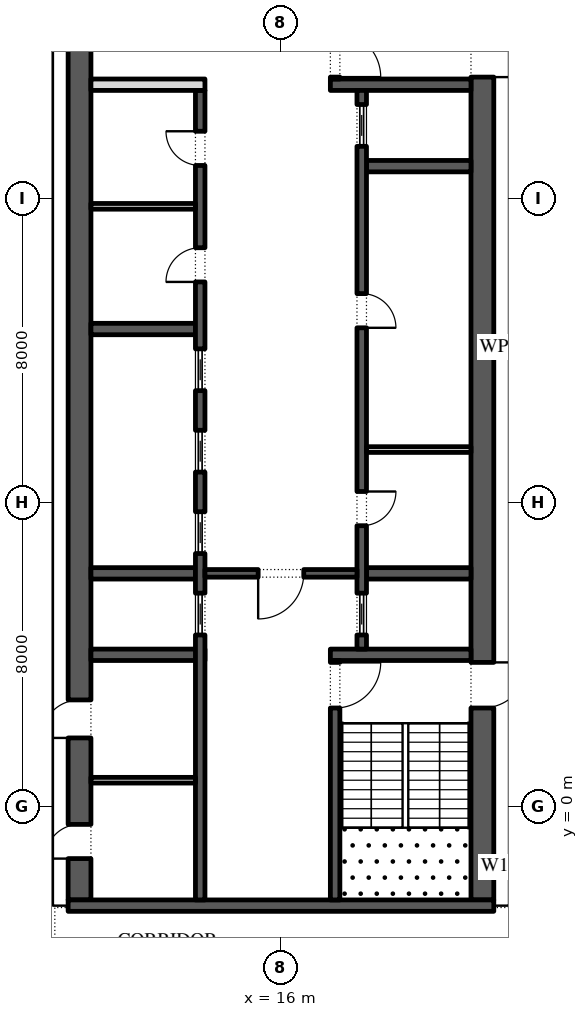
"""IFC4 building model, lengths in metres.
Left out: names, types, materials, properties, quantities, classifications, styles, units other than length and angle.
Written with IfcOpenShell. Run it as: python <this file> out.ifc"""

import sys

from ifc_helpers import new_model, si_unit, direction, frame, frame_2d, origin, place, context, subcontext, project, spatial, rectangle, extrude, element, fill, save


model = new_model("IFC4")
c1 = context("Model", 3, precision=1e-05, world=origin(), true_north=direction((0.0, 1.0)))
c2 = subcontext(c1, "Body", "Model", "MODEL_VIEW")
j1 = project(units=[si_unit("LENGTHUNIT", "METRE"), si_unit("PLANEANGLEUNIT", "RADIAN")], contexts=[c1])
p1 = place(None, origin())
s1 = spatial("IfcSite", under=j1, at=p1, CompositionType="ELEMENT")
p2 = place(p1, origin())
s2 = spatial("IfcBuilding", under=s1, at=p2, CompositionType="ELEMENT")
p3 = place(p2, frame((0.0, 0.0, 280.8)))
s3 = spatial("IfcBuildingStorey", under=s2, at=p3, CompositionType="ELEMENT", Elevation=280.8)
p4 = place(p3, frame((21.359, -11.678, 0.0), z_axis=(0.0, 0.0, 1.0), x_axis=(0.224949198343, 0.974370493275, 0.0)))
e1 = element("IfcWall", 1, at=p4, inside=s3, PredefinedType="STANDARD", context=c2, shape_type="SweptSolid", body=[
    extrude(rectangle(XDim=49.5, YDim=0.3, at=frame_2d((24.75, 0.0))), origin(), (0.0, 0.0, 1.0), 4.0),
])
p5 = place(p4, frame((1.157, 0.0, 0.45)))
e2 = element("IfcOpeningElement", 2, at=p5, cuts=e1, PredefinedType="OPENING", context=c2, shape_type="SweptSolid", body=[
    extrude(rectangle(XDim=4.5, YDim=3.05, at=frame_2d((2.25, 1.525))), frame((0.0, 0.16, 0.0), z_axis=(0.0, -1.0, 0.0), x_axis=(1.0, 0.0, 0.0)), (0.0, 0.0, 1.0), 0.32),
])
p6 = place(p4, frame((8.121, 0.0, 0.45)))
e3 = element("IfcOpeningElement", 3, at=p6, cuts=e1, PredefinedType="OPENING", context=c2, shape_type="SweptSolid", body=[
    extrude(rectangle(XDim=4.5, YDim=3.05, at=frame_2d((2.25, 1.525))), frame((0.0, 0.16, 0.0), z_axis=(0.0, -1.0, 0.0), x_axis=(1.0, 0.0, 0.0)), (0.0, 0.0, 1.0), 0.32),
])
p7 = place(p4, frame((15.236, 0.0, 0.45)))
e4 = element("IfcOpeningElement", 4, at=p7, cuts=e1, PredefinedType="OPENING", context=c2, shape_type="SweptSolid", body=[
    extrude(rectangle(XDim=4.5, YDim=3.05, at=frame_2d((2.25, 1.525))), frame((0.0, 0.16, 0.0), z_axis=(0.0, -1.0, 0.0), x_axis=(1.0, 0.0, 0.0)), (0.0, 0.0, 1.0), 0.32),
])
p8 = place(p4, frame((22.35, 0.0, 0.45)))
e5 = element("IfcOpeningElement", 5, at=p8, cuts=e1, PredefinedType="OPENING", context=c2, shape_type="SweptSolid", body=[
    extrude(rectangle(XDim=4.5, YDim=3.05, at=frame_2d((2.25, 1.525))), frame((0.0, 0.16, 0.0), z_axis=(0.0, -1.0, 0.0), x_axis=(1.0, 0.0, 0.0)), (0.0, 0.0, 1.0), 0.32),
])
p9 = place(p4, frame((29.464, 0.0, 0.45)))
e6 = element("IfcOpeningElement", 6, at=p9, cuts=e1, PredefinedType="OPENING", context=c2, shape_type="SweptSolid", body=[
    extrude(rectangle(XDim=4.5, YDim=2.95, at=frame_2d((2.25, 1.475))), frame((0.0, 0.16, 0.0), z_axis=(0.0, -1.0, 0.0), x_axis=(1.0, 0.0, 0.0)), (0.0, 0.0, 1.0), 0.32),
])
p10 = place(p4, frame((37.628, 0.0, 0.0)))
e7 = element("IfcOpeningElement", 7, at=p10, cuts=e1, PredefinedType="OPENING", context=c2, shape_type="SweptSolid", body=[
    extrude(rectangle(XDim=2.4, YDim=3.325, at=frame_2d((1.2, 1.663))), frame((0.0, 0.16, 0.0), z_axis=(0.0, -1.0, 0.0), x_axis=(1.0, 0.0, 0.0)), (0.0, 0.0, 1.0), 0.32),
])
p11 = place(p4, frame((43.693, 0.0, 0.45)))
e8 = element("IfcOpeningElement", 8, at=p11, cuts=e1, PredefinedType="OPENING", context=c2, shape_type="SweptSolid", body=[
    extrude(rectangle(XDim=4.5, YDim=2.575, at=frame_2d((2.25, 1.288))), frame((0.0, 0.16, 0.0), z_axis=(0.0, -1.0, 0.0), x_axis=(1.0, 0.0, 0.0)), (0.0, 0.0, 1.0), 0.32),
])
p12 = place(p3, frame((21.3, -2.45, 0.0), z_axis=(0.0, 0.0, 1.0), x_axis=(0.0, 1.0, 0.0)))
e9 = element("IfcWall", 9, at=p12, inside=s3, PredefinedType="SHEAR", context=c2, shape_type="SweptSolid", body=[
    extrude(rectangle(XDim=27.9, YDim=0.6, at=frame_2d((13.95, 0.0))), origin(), (0.0, 0.0, 1.0), 4.0),
])
p13 = place(p12, frame((5.05, 0.0, 0.0)))
e10 = element("IfcOpeningElement", 10, at=p13, cuts=e9, PredefinedType="OPENING", context=c2, shape_type="SweptSolid", body=[
    extrude(rectangle(XDim=1.2, YDim=2.1, at=frame_2d((0.6, 1.05))), frame((0.0, 0.31, 0.0), z_axis=(0.0, -1.0, 0.0), x_axis=(1.0, 0.0, 0.0)), (0.0, 0.0, 1.0), 0.62),
])
p14 = place(p12, frame((21.65, 0.0, 0.0)))
e11 = element("IfcOpeningElement", 11, at=p14, cuts=e9, PredefinedType="OPENING", context=c2, shape_type="SweptSolid", body=[
    extrude(rectangle(XDim=1.2, YDim=2.1, at=frame_2d((0.6, 1.05))), frame((0.0, 0.31, 0.0), z_axis=(0.0, -1.0, 0.0), x_axis=(1.0, 0.0, 0.0)), (0.0, 0.0, 1.0), 0.62),
])
p15 = place(p3, frame((10.7, -2.45, 0.0), z_axis=(0.0, 0.0, 1.0), x_axis=(0.0, 1.0, 0.0)))
e12 = element("IfcWall", 12, at=p15, inside=s3, PredefinedType="SHEAR", context=c2, shape_type="SweptSolid", body=[
    extrude(rectangle(XDim=27.9, YDim=0.6, at=frame_2d((13.95, 0.0))), origin(), (0.0, 0.0, 1.0), 4.0),
])
p16 = place(p15, frame((23.65, 0.0, 0.0)))
e13 = element("IfcOpeningElement", 13, at=p16, cuts=e12, PredefinedType="OPENING", context=c2, shape_type="SweptSolid", body=[
    extrude(rectangle(XDim=2.4, YDim=2.1, at=frame_2d((1.2, 1.05))), frame((0.0, 0.31, 0.0), z_axis=(0.0, -1.0, 0.0), x_axis=(1.0, 0.0, 0.0)), (0.0, 0.0, 1.0), 0.62),
])
p17 = place(p15, frame((1.087, 0.0, 0.0)))
e14 = element("IfcOpeningElement", 14, at=p17, cuts=e12, PredefinedType="OPENING", context=c2, shape_type="SweptSolid", body=[
    extrude(rectangle(XDim=0.9, YDim=2.1, at=frame_2d((0.45, 1.05))), frame((0.0, 0.31, 0.0), z_axis=(0.0, -1.0, 0.0), x_axis=(1.0, 0.0, 0.0)), (0.0, 0.0, 1.0), 0.62),
])
p18 = place(p15, frame((4.262, 0.0, 0.0)))
e15 = element("IfcOpeningElement", 15, at=p18, cuts=e12, PredefinedType="OPENING", context=c2, shape_type="SweptSolid", body=[
    extrude(rectangle(XDim=1.0, YDim=2.1, at=frame_2d((0.5, 1.05))), frame((0.0, 0.31, 0.0), z_axis=(0.0, -1.0, 0.0), x_axis=(1.0, 0.0, 0.0)), (0.0, 0.0, 1.0), 0.62),
])
p19 = place(p3, frame((10.4, -2.6, 0.0), z_axis=(0.0, 0.0, 1.0), x_axis=(1.0, 0.0, 0.0)))
e16 = element("IfcWall", 16, at=p19, inside=s3, PredefinedType="SHEAR", context=c2, shape_type="SweptSolid", body=[
    extrude(rectangle(XDim=11.2, YDim=0.3, at=frame_2d((5.6, 0.0))), origin(), (0.0, 0.0, 1.0), 4.0),
])
p20 = place(p3, frame((17.3, 4.0, 0.0), z_axis=(0.0, 0.0, 1.0), x_axis=(1.0, 0.0, 0.0)))
e17 = element("IfcWall", 17, at=p20, inside=s3, PredefinedType="SHEAR", context=c2, shape_type="SweptSolid", body=[
    extrude(rectangle(XDim=3.7, YDim=0.3, at=frame_2d((1.85, 0.0))), origin(), (0.0, 0.0, 1.0), 4.0),
])
p21 = place(p3, frame((17.425, -2.45, 0.0), z_axis=(0.0, 0.0, 1.0), x_axis=(0.0, 1.0, 0.0)))
e18 = element("IfcWall", 18, at=p21, inside=s3, PredefinedType="SHEAR", context=c2, shape_type="SweptSolid", body=[
    extrude(rectangle(XDim=6.3, YDim=0.25, at=frame_2d((3.15, 0.0))), origin(), (0.0, 0.0, 1.0), 4.0),
])
p22 = place(p21, frame((5.05, 0.0, 0.0)))
e19 = element("IfcOpeningElement", 19, at=p22, cuts=e18, PredefinedType="OPENING", context=c2, shape_type="SweptSolid", body=[
    extrude(rectangle(XDim=1.2, YDim=2.1, at=frame_2d((0.6, 1.05))), frame((0.0, 0.135, 0.0), z_axis=(0.0, -1.0, 0.0), x_axis=(1.0, 0.0, 0.0)), (0.0, 0.0, 1.0), 0.27),
])
p23 = place(p3, frame((17.3, 19.0, 0.0), z_axis=(0.0, 0.0, 1.0), x_axis=(1.0, 0.0, 0.0)))
e20 = element("IfcWall", 20, at=p23, inside=s3, PredefinedType="SHEAR", context=c2, shape_type="SweptSolid", body=[
    extrude(rectangle(XDim=3.7, YDim=0.3, at=frame_2d((1.85, 0.0))), origin(), (0.0, 0.0, 1.0), 4.0),
])
p24 = place(p3, frame((17.425, 19.15, 0.0), z_axis=(0.0, 0.0, 1.0), x_axis=(0.0, 1.0, 0.0)))
e21 = element("IfcWall", 21, at=p24, inside=s3, PredefinedType="SHEAR", context=c2, shape_type="SweptSolid", body=[
    extrude(rectangle(XDim=6.3, YDim=0.25, at=frame_2d((3.15, 0.0))), origin(), (0.0, 0.0, 1.0), 4.0),
])
p25 = place(p24, frame((0.05, 0.0, 0.0)))
e22 = element("IfcOpeningElement", 22, at=p25, cuts=e21, PredefinedType="OPENING", context=c2, shape_type="SweptSolid", body=[
    extrude(rectangle(XDim=1.2, YDim=2.1, at=frame_2d((0.6, 1.05))), frame((0.0, 0.135, 0.0), z_axis=(0.0, -1.0, 0.0), x_axis=(1.0, 0.0, 0.0)), (0.0, 0.0, 1.0), 0.27),
])
for number, where, z_axis, x_axis in (
    (23, (18.25, 6.143, 0.0), (0.0, 0.0, 1.0), (1.0, 0.0, 0.0)),
    (24, (18.25, 16.857, 0.0), (0.0, 0.0, 1.0), (1.0, 0.0, 0.0)),
):
    element("IfcWall", number, at=place(p3, frame(where, z_axis=z_axis, x_axis=x_axis)), inside=s3, PredefinedType="SHEAR", context=c2, shape_type="SweptSolid", body=[
        extrude(rectangle(XDim=2.75, YDim=0.3, at=frame_2d((1.375, 0.0))), origin(), (0.0, 0.0, 1.0), 4.0),
    ])
p26 = place(p3, frame((18.125, 4.15, 0.0), z_axis=(0.0, 0.0, 1.0), x_axis=(0.0, 1.0, 0.0)))
e25 = element("IfcWall", 25, at=p26, inside=s3, PredefinedType="SHEAR", context=c2, shape_type="SweptSolid", body=[
    extrude(rectangle(XDim=14.7, YDim=0.25, at=frame_2d((7.35, 0.0))), origin(), (0.0, 0.0, 1.0), 4.0),
])
p27 = place(p26, frame((3.246, 0.0, 0.0)))
e26 = element("IfcOpeningElement", 26, at=p27, cuts=e25, PredefinedType="OPENING", context=c2, shape_type="SweptSolid", body=[
    extrude(rectangle(XDim=0.9, YDim=2.1, at=frame_2d((0.45, 1.05))), frame((0.0, 0.135, 0.0), z_axis=(0.0, -1.0, 0.0), x_axis=(1.0, 0.0, 0.0)), (0.0, 0.0, 1.0), 0.27),
])
p28 = place(p26, frame((8.454, 0.0, 0.0)))
e27 = element("IfcOpeningElement", 27, at=p28, cuts=e25, PredefinedType="OPENING", context=c2, shape_type="SweptSolid", body=[
    extrude(rectangle(XDim=0.9, YDim=2.1, at=frame_2d((0.45, 1.05))), frame((0.0, 0.135, 0.0), z_axis=(0.0, -1.0, 0.0), x_axis=(1.0, 0.0, 0.0)), (0.0, 0.0, 1.0), 0.27),
])
p29 = place(p26, frame((0.371, 0.0, 0.0)))
e28 = element("IfcOpeningElement", 28, at=p29, cuts=e25, PredefinedType="OPENING", context=c2, shape_type="SweptSolid", body=[
    extrude(rectangle(XDim=1.1, YDim=2.1, at=frame_2d((0.55, 1.05))), frame((0.0, 0.135, 0.0), z_axis=(0.0, -1.0, 0.0), x_axis=(1.0, 0.0, 0.0)), (0.0, 0.0, 1.0), 0.27),
])
p30 = place(p26, frame((13.229, 0.0, 0.0)))
e29 = element("IfcOpeningElement", 29, at=p30, cuts=e25, PredefinedType="OPENING", context=c2, shape_type="SweptSolid", body=[
    extrude(rectangle(XDim=1.1, YDim=2.1, at=frame_2d((0.55, 1.05))), frame((0.0, 0.135, 0.0), z_axis=(0.0, -1.0, 0.0), x_axis=(1.0, 0.0, 0.0)), (0.0, 0.0, 1.0), 0.27),
])
p31 = place(p3, frame((18.25, 9.4, 0.0), z_axis=(0.0, 0.0, 1.0), x_axis=(1.0, 0.0, 0.0)))
e30 = element("IfcWall", 30, at=p31, inside=s3, PredefinedType="PARTITIONING", context=c2, shape_type="SweptSolid", body=[
    extrude(rectangle(XDim=2.75, YDim=0.15, at=frame_2d((1.375, 0.0))), origin(), (0.0, 0.0, 1.0), 4.0),
])
p32 = place(p3, frame((11.0, 4.0, 0.0), z_axis=(0.0, 0.0, 1.0), x_axis=(1.0, 0.0, 0.0)))
e31 = element("IfcWall", 31, at=p32, inside=s3, PredefinedType="SHEAR", context=c2, shape_type="SweptSolid", body=[
    extrude(rectangle(XDim=3.0, YDim=0.3, at=frame_2d((1.5, 0.0))), origin(), (0.0, 0.0, 1.0), 4.0),
])
for number, where, z_axis, x_axis in (
    (32, (11.0, 6.143, 0.0), (0.0, 0.0, 1.0), (1.0, 0.0, 0.0)),
    (33, (11.0, 12.571, 0.0), (0.0, 0.0, 1.0), (1.0, 0.0, 0.0)),
):
    element("IfcWall", number, at=place(p3, frame(where, z_axis=z_axis, x_axis=x_axis)), inside=s3, PredefinedType="SHEAR", context=c2, shape_type="SweptSolid", body=[
        extrude(rectangle(XDim=2.75, YDim=0.3, at=frame_2d((1.375, 0.0))), origin(), (0.0, 0.0, 1.0), 4.0),
    ])
p33 = place(p3, frame((13.875, -2.45, 0.0), z_axis=(0.0, 0.0, 1.0), x_axis=(0.0, 1.0, 0.0)))
e34 = element("IfcWall", 34, at=p33, inside=s3, PredefinedType="SHEAR", context=c2, shape_type="SweptSolid", body=[
    extrude(rectangle(XDim=21.3, YDim=0.25, at=frame_2d((10.65, 0.0))), origin(), (0.0, 0.0, 1.0), 4.0),
])
p34 = place(p33, frame((16.261, 0.0, 0.0)))
e35 = element("IfcOpeningElement", 35, at=p34, cuts=e34, PredefinedType="OPENING", context=c2, shape_type="SweptSolid", body=[
    extrude(rectangle(XDim=0.9, YDim=2.1, at=frame_2d((0.45, 1.05))), frame((0.0, 0.135, 0.0), z_axis=(0.0, -1.0, 0.0), x_axis=(1.0, 0.0, 0.0)), (0.0, 0.0, 1.0), 0.27),
])
p35 = place(p33, frame((19.325, 0.0, 0.0)))
e36 = element("IfcOpeningElement", 36, at=p35, cuts=e34, PredefinedType="OPENING", context=c2, shape_type="SweptSolid", body=[
    extrude(rectangle(XDim=0.9, YDim=2.1, at=frame_2d((0.45, 1.05))), frame((0.0, 0.135, 0.0), z_axis=(0.0, -1.0, 0.0), x_axis=(1.0, 0.0, 0.0)), (0.0, 0.0, 1.0), 0.27),
])
p36 = place(p33, frame((6.971, 0.0, 0.0)))
e37 = element("IfcOpeningElement", 37, at=p36, cuts=e34, PredefinedType="OPENING", context=c2, shape_type="SweptSolid", body=[
    extrude(rectangle(XDim=1.1, YDim=2.1, at=frame_2d((0.55, 1.05))), frame((0.0, 0.135, 0.0), z_axis=(0.0, -1.0, 0.0), x_axis=(1.0, 0.0, 0.0)), (0.0, 0.0, 1.0), 0.27),
])
p37 = place(p33, frame((9.114, 0.0, 0.0)))
e38 = element("IfcOpeningElement", 38, at=p37, cuts=e34, PredefinedType="OPENING", context=c2, shape_type="SweptSolid", body=[
    extrude(rectangle(XDim=1.1, YDim=2.1, at=frame_2d((0.55, 1.05))), frame((0.0, 0.135, 0.0), z_axis=(0.0, -1.0, 0.0), x_axis=(1.0, 0.0, 0.0)), (0.0, 0.0, 1.0), 0.27),
])
p38 = place(p33, frame((11.257, 0.0, 0.0)))
e39 = element("IfcOpeningElement", 39, at=p38, cuts=e34, PredefinedType="OPENING", context=c2, shape_type="SweptSolid", body=[
    extrude(rectangle(XDim=1.1, YDim=2.1, at=frame_2d((0.55, 1.05))), frame((0.0, 0.135, 0.0), z_axis=(0.0, -1.0, 0.0), x_axis=(1.0, 0.0, 0.0)), (0.0, 0.0, 1.0), 0.27),
])
p39 = place(p33, frame((13.4, 0.0, 0.0)))
e40 = element("IfcOpeningElement", 40, at=p39, cuts=e34, PredefinedType="OPENING", context=c2, shape_type="SweptSolid", body=[
    extrude(rectangle(XDim=1.1, YDim=2.1, at=frame_2d((0.55, 1.05))), frame((0.0, 0.135, 0.0), z_axis=(0.0, -1.0, 0.0), x_axis=(1.0, 0.0, 0.0)), (0.0, 0.0, 1.0), 0.27),
])
p40 = place(p3, frame((11.0, 19.0, 0.0), z_axis=(0.0, 0.0, 1.0), x_axis=(1.0, 0.0, 0.0)))
e41 = element("IfcWall", 41, at=p40, inside=s3, PredefinedType="PARTITIONING", context=c2, shape_type="SweptSolid", body=[
    extrude(rectangle(XDim=3.0, YDim=0.3, at=frame_2d((1.5, 0.0))), origin(), (0.0, 0.0, 1.0), 4.0),
])
p41 = place(p3, frame((11.0, 15.8, 0.0), z_axis=(0.0, 0.0, 1.0), x_axis=(1.0, 0.0, 0.0)))
e42 = element("IfcWall", 42, at=p41, inside=s3, PredefinedType="PARTITIONING", context=c2, shape_type="SweptSolid", body=[
    extrude(rectangle(XDim=2.75, YDim=0.15, at=frame_2d((1.375, 0.0))), origin(), (0.0, 0.0, 1.0), 4.0),
])
p42 = place(p3, frame((14.0, 6.143, 0.0), z_axis=(0.0, 0.0, 1.0), x_axis=(1.0, 0.0, 0.0)))
e43 = element("IfcWall", 43, at=p42, inside=s3, PredefinedType="SHEAR", context=c2, shape_type="SweptSolid", body=[
    extrude(rectangle(XDim=4.0, YDim=0.2, at=frame_2d((2.0, 0.0))), origin(), (0.0, 0.0, 1.0), 4.0),
])
p43 = place(p42, frame((1.4, 0.0, 0.0)))
e44 = element("IfcOpeningElement", 44, at=p43, cuts=e43, PredefinedType="OPENING", context=c2, shape_type="SweptSolid", body=[
    extrude(rectangle(XDim=1.2, YDim=2.1, at=frame_2d((0.6, 1.05))), frame((0.0, 0.11, 0.0), z_axis=(0.0, -1.0, 0.0), x_axis=(1.0, 0.0, 0.0)), (0.0, 0.0, 1.0), 0.22),
])
p44 = place(p3, frame((11.0, 0.7, 0.0), z_axis=(0.0, 0.0, 1.0), x_axis=(1.0, 0.0, 0.0)))
e45 = element("IfcWall", 45, at=p44, inside=s3, PredefinedType="PARTITIONING", context=c2, shape_type="SweptSolid", body=[
    extrude(rectangle(XDim=2.75, YDim=0.15, at=frame_2d((1.375, 0.0))), origin(), (0.0, 0.0, 1.0), 4.0),
])
p45 = place(p27, frame((0.9, -0.2, 0.0), z_axis=(0.0, 0.0, 1.0), x_axis=(-1.0, 0.0, 0.0)))
e46 = element("IfcDoor", 46, at=p45, inside=s3, OperationType="SINGLE_SWING_RIGHT", PredefinedType="DOOR", context=c2, shape_type="SweptSolid", body=[
    extrude(rectangle(XDim=0.9, YDim=2.1, at=frame_2d((0.45, 1.05))), frame((0.0, -0.075, 0.0), z_axis=(0.0, -1.0, 0.0), x_axis=(1.0, 0.0, 0.0)), (0.0, 0.0, 1.0), 0.05),
])
fill(e26, e46)
p46 = place(p28, frame((0.9, -0.2, 0.0), z_axis=(0.0, 0.0, 1.0), x_axis=(-1.0, 0.0, 0.0)))
e47 = element("IfcDoor", 47, at=p46, inside=s3, OperationType="SINGLE_SWING_LEFT", PredefinedType="DOOR", context=c2, shape_type="SweptSolid", body=[
    extrude(rectangle(XDim=0.9, YDim=2.1, at=frame_2d((0.45, 1.05))), frame((0.0, -0.075, 0.0), z_axis=(0.0, -1.0, 0.0), x_axis=(1.0, 0.0, 0.0)), (0.0, 0.0, 1.0), 0.05),
])
fill(e27, e47)
p47 = place(p29, origin())
e48 = element("IfcDoor", 48, at=p47, inside=s3, OperationType="SLIDING_TO_LEFT", PredefinedType="DOOR", context=c2, shape_type="SweptSolid", body=[
    extrude(rectangle(XDim=1.1, YDim=2.1, at=frame_2d((0.55, 1.05))), frame((0.0, 0.025, 0.0), z_axis=(0.0, -1.0, 0.0), x_axis=(1.0, 0.0, 0.0)), (0.0, 0.0, 1.0), 0.05),
])
fill(e28, e48)
p48 = place(p30, origin())
e49 = element("IfcDoor", 49, at=p48, inside=s3, OperationType="SLIDING_TO_LEFT", PredefinedType="DOOR", context=c2, shape_type="SweptSolid", body=[
    extrude(rectangle(XDim=1.1, YDim=2.1, at=frame_2d((0.55, 1.05))), frame((0.0, 0.025, 0.0), z_axis=(0.0, -1.0, 0.0), x_axis=(1.0, 0.0, 0.0)), (0.0, 0.0, 1.0), 0.05),
])
fill(e29, e49)
p49 = place(p34, origin())
e50 = element("IfcDoor", 50, at=p49, inside=s3, OperationType="SINGLE_SWING_RIGHT", PredefinedType="DOOR", context=c2, shape_type="SweptSolid", body=[
    extrude(rectangle(XDim=0.9, YDim=2.1, at=frame_2d((0.45, 1.05))), frame((0.0, 0.125, 0.0), z_axis=(0.0, -1.0, 0.0), x_axis=(1.0, 0.0, 0.0)), (0.0, 0.0, 1.0), 0.05),
])
fill(e35, e50)
p50 = place(p35, origin())
e51 = element("IfcDoor", 51, at=p50, inside=s3, OperationType="SINGLE_SWING_LEFT", PredefinedType="DOOR", context=c2, shape_type="SweptSolid", body=[
    extrude(rectangle(XDim=0.9, YDim=2.1, at=frame_2d((0.45, 1.05))), frame((0.0, 0.125, 0.0), z_axis=(0.0, -1.0, 0.0), x_axis=(1.0, 0.0, 0.0)), (0.0, 0.0, 1.0), 0.05),
])
fill(e36, e51)
p51 = place(p36, origin())
e52 = element("IfcDoor", 52, at=p51, inside=s3, OperationType="SLIDING_TO_LEFT", PredefinedType="DOOR", context=c2, shape_type="SweptSolid", body=[
    extrude(rectangle(XDim=1.1, YDim=2.1, at=frame_2d((0.55, 1.05))), frame((0.0, 0.025, 0.0), z_axis=(0.0, -1.0, 0.0), x_axis=(1.0, 0.0, 0.0)), (0.0, 0.0, 1.0), 0.05),
])
fill(e37, e52)
p52 = place(p37, origin())
e53 = element("IfcDoor", 53, at=p52, inside=s3, OperationType="SLIDING_TO_LEFT", PredefinedType="DOOR", context=c2, shape_type="SweptSolid", body=[
    extrude(rectangle(XDim=1.1, YDim=2.1, at=frame_2d((0.55, 1.05))), frame((0.0, 0.025, 0.0), z_axis=(0.0, -1.0, 0.0), x_axis=(1.0, 0.0, 0.0)), (0.0, 0.0, 1.0), 0.05),
])
fill(e38, e53)
p53 = place(p38, origin())
e54 = element("IfcDoor", 54, at=p53, inside=s3, OperationType="SLIDING_TO_LEFT", PredefinedType="DOOR", context=c2, shape_type="SweptSolid", body=[
    extrude(rectangle(XDim=1.1, YDim=2.1, at=frame_2d((0.55, 1.05))), frame((0.0, 0.025, 0.0), z_axis=(0.0, -1.0, 0.0), x_axis=(1.0, 0.0, 0.0)), (0.0, 0.0, 1.0), 0.05),
])
fill(e39, e54)
p54 = place(p39, origin())
e55 = element("IfcDoor", 55, at=p54, inside=s3, OperationType="SLIDING_TO_LEFT", PredefinedType="DOOR", context=c2, shape_type="SweptSolid", body=[
    extrude(rectangle(XDim=1.1, YDim=2.1, at=frame_2d((0.55, 1.05))), frame((0.0, 0.025, 0.0), z_axis=(0.0, -1.0, 0.0), x_axis=(1.0, 0.0, 0.0)), (0.0, 0.0, 1.0), 0.05),
])
fill(e40, e55)
p55 = place(p43, frame((1.2, 0.0, 0.0), z_axis=(0.0, 0.0, 1.0), x_axis=(-1.0, 0.0, 0.0)))
e56 = element("IfcDoor", 56, at=p55, inside=s3, OperationType="SINGLE_SWING_LEFT", PredefinedType="DOOR", context=c2, shape_type="SweptSolid", body=[
    extrude(rectangle(XDim=1.2, YDim=2.1, at=frame_2d((0.6, 1.05))), frame((0.0, 0.025, 0.0), z_axis=(0.0, -1.0, 0.0), x_axis=(1.0, 0.0, 0.0)), (0.0, 0.0, 1.0), 0.05),
])
fill(e44, e56)
p56 = place(p22, frame((1.2, 0.0, 0.0), z_axis=(0.0, 0.0, 1.0), x_axis=(-1.0, 0.0, 0.0)))
e57 = element("IfcDoor", 57, at=p56, inside=s3, OperationType="SINGLE_SWING_RIGHT", PredefinedType="DOOR", context=c2, shape_type="SweptSolid", body=[
    extrude(rectangle(XDim=1.2, YDim=2.1, at=frame_2d((0.6, 1.05))), frame((0.0, 0.025, 0.0), z_axis=(0.0, -1.0, 0.0), x_axis=(1.0, 0.0, 0.0)), (0.0, 0.0, 1.0), 0.05),
])
fill(e19, e57)
p57 = place(p13, frame((1.2, 0.0, 0.0), z_axis=(0.0, 0.0, 1.0), x_axis=(-1.0, 0.0, 0.0)))
e58 = element("IfcDoor", 58, at=p57, inside=s3, OperationType="SINGLE_SWING_RIGHT", PredefinedType="DOOR", context=c2, shape_type="SweptSolid", body=[
    extrude(rectangle(XDim=1.2, YDim=2.1, at=frame_2d((0.6, 1.05))), frame((0.0, 0.025, 0.0), z_axis=(0.0, -1.0, 0.0), x_axis=(1.0, 0.0, 0.0)), (0.0, 0.0, 1.0), 0.05),
])
fill(e10, e58)
p58 = place(p25, frame((1.2, 0.0, 0.0), z_axis=(0.0, 0.0, 1.0), x_axis=(-1.0, 0.0, 0.0)))
e59 = element("IfcDoor", 59, at=p58, inside=s3, OperationType="SINGLE_SWING_LEFT", PredefinedType="DOOR", context=c2, shape_type="SweptSolid", body=[
    extrude(rectangle(XDim=1.2, YDim=2.1, at=frame_2d((0.6, 1.05))), frame((0.0, 0.025, 0.0), z_axis=(0.0, -1.0, 0.0), x_axis=(1.0, 0.0, 0.0)), (0.0, 0.0, 1.0), 0.05),
])
fill(e22, e59)
p59 = place(p14, frame((1.2, 0.0, 0.0), z_axis=(0.0, 0.0, 1.0), x_axis=(-1.0, 0.0, 0.0)))
e60 = element("IfcDoor", 60, at=p59, inside=s3, OperationType="SINGLE_SWING_LEFT", PredefinedType="DOOR", context=c2, shape_type="SweptSolid", body=[
    extrude(rectangle(XDim=1.2, YDim=2.1, at=frame_2d((0.6, 1.05))), frame((0.0, 0.025, 0.0), z_axis=(0.0, -1.0, 0.0), x_axis=(1.0, 0.0, 0.0)), (0.0, 0.0, 1.0), 0.05),
])
fill(e11, e60)
p60 = place(p17, origin())
e61 = element("IfcDoor", 61, at=p60, inside=s3, OperationType="SINGLE_SWING_RIGHT", PredefinedType="DOOR", context=c2, shape_type="SweptSolid", body=[
    extrude(rectangle(XDim=0.9, YDim=2.1, at=frame_2d((0.45, 1.05))), frame((0.0, -0.25, 0.0), z_axis=(0.0, -1.0, 0.0), x_axis=(1.0, 0.0, 0.0)), (0.0, 0.0, 1.0), 0.05),
])
fill(e14, e61)
p61 = place(p18, origin())
e62 = element("IfcDoor", 62, at=p61, inside=s3, OperationType="SINGLE_SWING_RIGHT", PredefinedType="DOOR", context=c2, shape_type="SweptSolid", body=[
    extrude(rectangle(XDim=1.0, YDim=2.1, at=frame_2d((0.5, 1.05))), frame((0.0, -0.25, 0.0), z_axis=(0.0, -1.0, 0.0), x_axis=(1.0, 0.0, 0.0)), (0.0, 0.0, 1.0), 0.05),
])
fill(e15, e62)
save(model, sys.argv[1])
